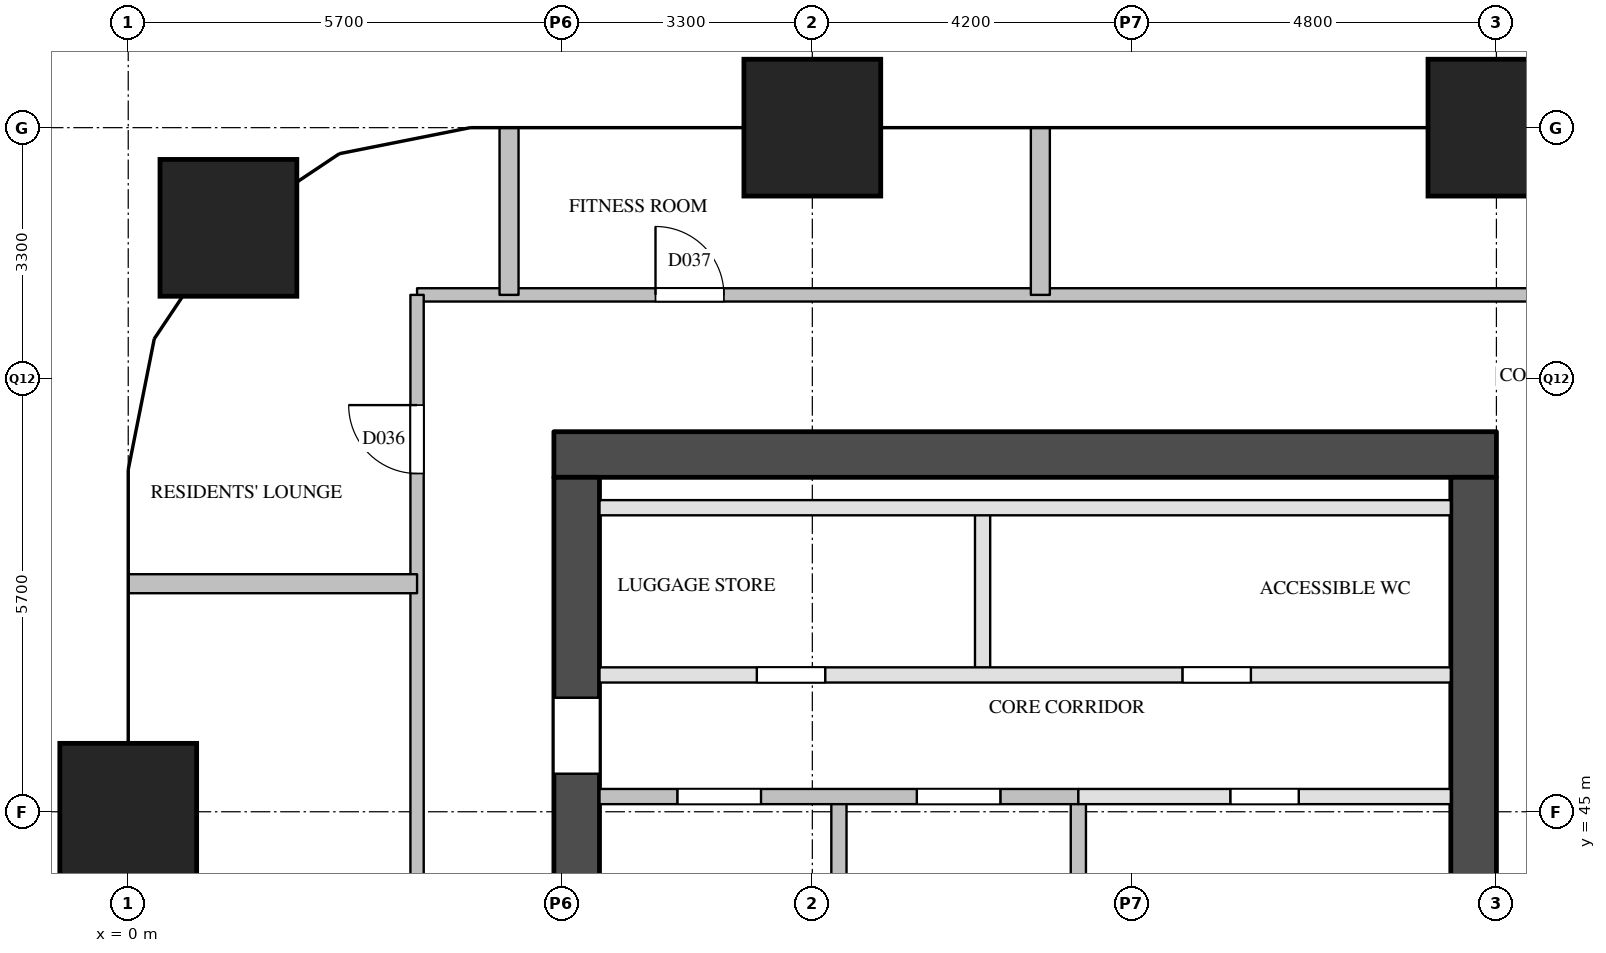
"""IFC4 building model, lengths in metres.
Left out: names, types, materials, properties, quantities, classifications, styles, units other than length and angle.
Written with IfcOpenShell. Run it as: python <this file> out.ifc"""

import sys

from ifc_helpers import new_model, si_unit, direction, frame, frame_2d, origin, origin_2d, place, context, subcontext, project, spatial, rectangle, extrude, element, fill, save


model = new_model("IFC4")
c1 = context("Model", 3, precision=1e-05, world=origin(), true_north=direction((0.0, 1.0)))
c2 = subcontext(c1, "Body", "Model", "MODEL_VIEW")
j1 = project(units=[si_unit("LENGTHUNIT", "METRE"), si_unit("PLANEANGLEUNIT", "RADIAN")], contexts=[c1])
p1 = place(None, origin())
s1 = spatial("IfcSite", under=j1, at=p1, CompositionType="ELEMENT")
p2 = place(p1, origin())
s2 = spatial("IfcBuilding", under=s1, at=p2, CompositionType="ELEMENT")
p3 = place(p2, frame((0.0, 0.0, 108.2)))
s3 = spatial("IfcBuildingStorey", under=s2, at=p3, CompositionType="ELEMENT", Elevation=108.2)
for number, where, z_axis, x_axis in (
    (1, (0.0, 45.0, 0.0), (0.0, 0.0, 1.0), (1.0, 0.0, 0.0)),
    (2, (1.318, 52.682, 0.0), (0.0, 0.0, 1.0), (1.0, 0.0, 0.0)),
    (3, (9.0, 54.0, 0.0), (0.0, 0.0, 1.0), (1.0, 0.0, 0.0)),
    (4, (18.0, 54.0, 0.0), (0.0, 0.0, 1.0), (1.0, 0.0, 0.0)),
):
    element("IfcColumn", number, at=place(p3, frame(where, z_axis=z_axis, x_axis=x_axis)), inside=s3, PredefinedType="COLUMN", context=c2, shape_type="SweptSolid", body=[
        extrude(rectangle(XDim=1.8, YDim=1.8, at=origin_2d()), origin(), (0.0, 0.0, 1.0), 3.8),
    ])
p4 = place(p3, frame((5.6, 49.7, 0.0), z_axis=(0.0, 0.0, 1.0), x_axis=(1.0, 0.0, 0.0)))
e5 = element("IfcWall", 5, at=p4, inside=s3, PredefinedType="SHEAR", context=c2, shape_type="SweptSolid", body=[
    extrude(rectangle(XDim=12.4, YDim=0.6, at=frame_2d((6.2, 0.0))), origin(), (0.0, 0.0, 1.0), 3.5),
])
p5 = place(p3, frame((5.9, 29.1, 0.0), z_axis=(0.0, 0.0, 1.0), x_axis=(0.0, 1.0, 0.0)))
e6 = element("IfcWall", 6, at=p5, inside=s3, PredefinedType="SHEAR", context=c2, shape_type="SweptSolid", body=[
    extrude(rectangle(XDim=20.3, YDim=0.6, at=frame_2d((10.15, 0.0))), origin(), (0.0, 0.0, 1.0), 3.5),
])
p6 = place(p5, frame((3.6, 0.0, 0.0)))
e7 = element("IfcOpeningElement", 7, at=p6, cuts=e6, PredefinedType="OPENING", context=c2, shape_type="SweptSolid", body=[
    extrude(rectangle(XDim=1.8, YDim=2.1, at=frame_2d((0.9, 1.05))), frame((0.0, 0.31, 0.0), z_axis=(0.0, -1.0, 0.0), x_axis=(1.0, 0.0, 0.0)), (0.0, 0.0, 1.0), 0.62),
])
p7 = place(p5, frame((16.4, 0.0, 0.0)))
e8 = element("IfcOpeningElement", 8, at=p7, cuts=e6, PredefinedType="OPENING", context=c2, shape_type="SweptSolid", body=[
    extrude(rectangle(XDim=1.0, YDim=2.1, at=frame_2d((0.5, 1.05))), frame((0.0, 0.31, 0.0), z_axis=(0.0, -1.0, 0.0), x_axis=(1.0, 0.0, 0.0)), (0.0, 0.0, 1.0), 0.62),
])
p8 = place(p3, frame((17.7, 29.1, 0.0), z_axis=(0.0, 0.0, 1.0), x_axis=(0.0, 1.0, 0.0)))
e9 = element("IfcWall", 9, at=p8, inside=s3, PredefinedType="SHEAR", context=c2, shape_type="SweptSolid", body=[
    extrude(rectangle(XDim=20.3, YDim=0.6, at=frame_2d((10.15, 0.0))), origin(), (0.0, 0.0, 1.0), 3.5),
])
p9 = place(p8, frame((1.25, 0.0, 0.0)))
e10 = element("IfcOpeningElement", 10, at=p9, cuts=e9, PredefinedType="OPENING", context=c2, shape_type="SweptSolid", body=[
    extrude(rectangle(XDim=0.7, YDim=2.1, at=frame_2d((0.35, 1.05))), frame((0.0, 0.31, 0.0), z_axis=(0.0, -1.0, 0.0), x_axis=(1.0, 0.0, 0.0)), (0.0, 0.0, 1.0), 0.62),
])
p10 = place(p8, frame((7.05, 0.0, 0.0)))
e11 = element("IfcOpeningElement", 11, at=p10, cuts=e9, PredefinedType="OPENING", context=c2, shape_type="SweptSolid", body=[
    extrude(rectangle(XDim=0.7, YDim=2.1, at=frame_2d((0.35, 1.05))), frame((0.0, 0.31, 0.0), z_axis=(0.0, -1.0, 0.0), x_axis=(1.0, 0.0, 0.0)), (0.0, 0.0, 1.0), 0.62),
])
p11 = place(p3, frame((9.35, 40.9, 0.0), z_axis=(0.0, 0.0, 1.0), x_axis=(0.0, 1.0, 0.0)))
e12 = element("IfcWall", 12, at=p11, inside=s3, PredefinedType="SOLIDWALL", context=c2, shape_type="SweptSolid", body=[
    extrude(rectangle(XDim=4.3, YDim=0.2, at=frame_2d((2.15, 0.0))), origin(), (0.0, 0.0, 1.0), 3.5),
])
p12 = place(p3, frame((11.24, 46.8, 0.0), z_axis=(0.0, 0.0, 1.0), x_axis=(0.0, 1.0, 0.0)))
e13 = element("IfcWall", 13, at=p12, inside=s3, PredefinedType="PARTITIONING", context=c2, shape_type="SweptSolid", body=[
    extrude(rectangle(XDim=2.2, YDim=0.2, at=frame_2d((1.1, 0.0))), origin(), (0.0, 0.0, 1.0), 3.5),
])
p13 = place(p3, frame((12.5, 40.9, 0.0), z_axis=(0.0, 0.0, 1.0), x_axis=(0.0, 1.0, 0.0)))
e14 = element("IfcWall", 14, at=p13, inside=s3, PredefinedType="SOLIDWALL", context=c2, shape_type="SweptSolid", body=[
    extrude(rectangle(XDim=4.3, YDim=0.2, at=frame_2d((2.15, 0.0))), origin(), (0.0, 0.0, 1.0), 3.5),
])
p14 = place(p3, frame((12.5, 45.2, 0.0), z_axis=(0.0, 0.0, 1.0), x_axis=(1.0, 0.0, 0.0)))
e15 = element("IfcWall", 15, at=p14, inside=s3, PredefinedType="PARTITIONING", context=c2, shape_type="SweptSolid", body=[
    extrude(rectangle(XDim=4.9, YDim=0.2, at=frame_2d((2.45, 0.0))), origin(), (0.0, 0.0, 1.0), 3.5),
])
p15 = place(p14, frame((2.0, 0.0, 0.0)))
e16 = element("IfcOpeningElement", 16, at=p15, cuts=e15, PredefinedType="OPENING", context=c2, shape_type="SweptSolid", body=[
    extrude(rectangle(XDim=0.9, YDim=2.1, at=frame_2d((0.45, 1.05))), frame((0.0, 0.11, 0.0), z_axis=(0.0, -1.0, 0.0), x_axis=(1.0, 0.0, 0.0)), (0.0, 0.0, 1.0), 0.22),
])
p16 = place(p3, frame((6.2, 45.2, 0.0), z_axis=(0.0, 0.0, 1.0), x_axis=(1.0, 0.0, 0.0)))
e17 = element("IfcWall", 17, at=p16, inside=s3, PredefinedType="SOLIDWALL", context=c2, shape_type="SweptSolid", body=[
    extrude(rectangle(XDim=6.3, YDim=0.2, at=frame_2d((3.15, 0.0))), origin(), (0.0, 0.0, 1.0), 3.5),
])
p17 = place(p16, frame((1.025, 0.0, 0.0)))
e18 = element("IfcOpeningElement", 18, at=p17, cuts=e17, PredefinedType="OPENING", context=c2, shape_type="SweptSolid", body=[
    extrude(rectangle(XDim=1.1, YDim=2.1, at=frame_2d((0.55, 1.05))), frame((0.0, 0.11, 0.0), z_axis=(0.0, -1.0, 0.0), x_axis=(1.0, 0.0, 0.0)), (0.0, 0.0, 1.0), 0.22),
])
p18 = place(p16, frame((4.175, 0.0, 0.0)))
e19 = element("IfcOpeningElement", 19, at=p18, cuts=e17, PredefinedType="OPENING", context=c2, shape_type="SweptSolid", body=[
    extrude(rectangle(XDim=1.1, YDim=2.1, at=frame_2d((0.55, 1.05))), frame((0.0, 0.11, 0.0), z_axis=(0.0, -1.0, 0.0), x_axis=(1.0, 0.0, 0.0)), (0.0, 0.0, 1.0), 0.22),
])
p19 = place(p3, frame((6.2, 46.8, 0.0), z_axis=(0.0, 0.0, 1.0), x_axis=(1.0, 0.0, 0.0)))
e20 = element("IfcWall", 20, at=p19, inside=s3, PredefinedType="PARTITIONING", context=c2, shape_type="SweptSolid", body=[
    extrude(rectangle(XDim=11.2, YDim=0.2, at=frame_2d((5.6, 0.0))), origin(), (0.0, 0.0, 1.0), 3.5),
])
p20 = place(p19, frame((2.07, 0.0, 0.0)))
e21 = element("IfcOpeningElement", 21, at=p20, cuts=e20, PredefinedType="OPENING", context=c2, shape_type="SweptSolid", body=[
    extrude(rectangle(XDim=0.9, YDim=2.1, at=frame_2d((0.45, 1.05))), frame((0.0, 0.11, 0.0), z_axis=(0.0, -1.0, 0.0), x_axis=(1.0, 0.0, 0.0)), (0.0, 0.0, 1.0), 0.22),
])
p21 = place(p19, frame((7.67, 0.0, 0.0)))
e22 = element("IfcOpeningElement", 22, at=p21, cuts=e20, PredefinedType="OPENING", context=c2, shape_type="SweptSolid", body=[
    extrude(rectangle(XDim=0.9, YDim=2.1, at=frame_2d((0.45, 1.05))), frame((0.0, 0.11, 0.0), z_axis=(0.0, -1.0, 0.0), x_axis=(1.0, 0.0, 0.0)), (0.0, 0.0, 1.0), 0.22),
])
p22 = place(p3, frame((6.2, 49.0, 0.0), z_axis=(0.0, 0.0, 1.0), x_axis=(1.0, 0.0, 0.0)))
e23 = element("IfcWall", 23, at=p22, inside=s3, PredefinedType="PARTITIONING", context=c2, shape_type="SweptSolid", body=[
    extrude(rectangle(XDim=11.2, YDim=0.2, at=frame_2d((5.6, 0.0))), origin(), (0.0, 0.0, 1.0), 3.5),
])
p23 = place(p3, frame((3.8, 51.8, 0.0), z_axis=(0.0, 0.0, 1.0), x_axis=(1.0, 0.0, 0.0)))
e24 = element("IfcWall", 24, at=p23, inside=s3, PredefinedType="PARTITIONING", context=c2, shape_type="SweptSolid", body=[
    extrude(rectangle(XDim=16.0, YDim=0.175, at=frame_2d((8.0, 0.0))), origin(), (0.0, 0.0, 1.0), 3.5),
])
p24 = place(p23, frame((3.137, 0.0, 0.0)))
e25 = element("IfcOpeningElement", 25, at=p24, cuts=e24, PredefinedType="OPENING", context=c2, shape_type="SweptSolid", body=[
    extrude(rectangle(XDim=0.9, YDim=2.1, at=frame_2d((0.45, 1.05))), frame((0.0, 0.097, 0.0), z_axis=(0.0, -1.0, 0.0), x_axis=(1.0, 0.0, 0.0)), (0.0, 0.0, 1.0), 0.195),
])
p25 = place(p3, frame((3.8, 28.5, 0.0), z_axis=(0.0, 0.0, 1.0), x_axis=(0.0, 1.0, 0.0)))
e26 = element("IfcWall", 26, at=p25, inside=s3, PredefinedType="PARTITIONING", context=c2, shape_type="SweptSolid", body=[
    extrude(rectangle(XDim=23.3, YDim=0.175, at=frame_2d((11.65, 0.0))), origin(), (0.0, 0.0, 1.0), 3.5),
])
p26 = place(p25, frame((3.3, 0.0, 0.0)))
e27 = element("IfcOpeningElement", 27, at=p26, cuts=e26, PredefinedType="OPENING", context=c2, shape_type="SweptSolid", body=[
    extrude(rectangle(XDim=0.9, YDim=2.1, at=frame_2d((0.45, 1.05))), frame((0.0, 0.097, 0.0), z_axis=(0.0, -1.0, 0.0), x_axis=(1.0, 0.0, 0.0)), (0.0, 0.0, 1.0), 0.195),
])
p27 = place(p25, frame((13.05, 0.0, 0.0)))
e28 = element("IfcOpeningElement", 28, at=p27, cuts=e26, PredefinedType="OPENING", context=c2, shape_type="SweptSolid", body=[
    extrude(rectangle(XDim=0.9, YDim=2.1, at=frame_2d((0.45, 1.05))), frame((0.0, 0.097, 0.0), z_axis=(0.0, -1.0, 0.0), x_axis=(1.0, 0.0, 0.0)), (0.0, 0.0, 1.0), 0.195),
])
p28 = place(p25, frame((20.95, 0.0, 0.0)))
e29 = element("IfcOpeningElement", 29, at=p28, cuts=e26, PredefinedType="OPENING", context=c2, shape_type="SweptSolid", body=[
    extrude(rectangle(XDim=0.9, YDim=2.1, at=frame_2d((0.45, 1.05))), frame((0.0, 0.097, 0.0), z_axis=(0.0, -1.0, 0.0), x_axis=(1.0, 0.0, 0.0)), (0.0, 0.0, 1.0), 0.195),
])
p29 = place(p3, frame((0.0, 48.0, 0.0), z_axis=(0.0, 0.0, 1.0), x_axis=(1.0, 0.0, 0.0)))
e30 = element("IfcWall", 30, at=p29, inside=s3, PredefinedType="PARTITIONING", context=c2, shape_type="SweptSolid", body=[
    extrude(rectangle(XDim=3.8, YDim=0.25, at=frame_2d((1.9, 0.0))), origin(), (0.0, 0.0, 1.0), 2.5),
])
for number, where, z_axis, x_axis in (
    (31, (5.01, 51.8, 0.0), (0.0, 0.0, 1.0), (0.0, 1.0, 0.0)),
    (32, (12.0, 51.8, 0.0), (0.0, 0.0, 1.0), (0.0, 1.0, 0.0)),
):
    element("IfcWall", number, at=place(p3, frame(where, z_axis=z_axis, x_axis=x_axis)), inside=s3, PredefinedType="PARTITIONING", context=c2, shape_type="SweptSolid", body=[
        extrude(rectangle(XDim=2.2, YDim=0.25, at=frame_2d((1.1, 0.0))), origin(), (0.0, 0.0, 1.0), 2.5),
    ])
p30 = place(p17, origin())
e33 = element("IfcDoor", 33, at=p30, inside=s3, OperationType="SINGLE_SWING_LEFT", PredefinedType="DOOR", context=c2, shape_type="SweptSolid", body=[
    extrude(rectangle(XDim=1.1, YDim=2.1, at=frame_2d((0.55, 1.05))), frame((0.0, 0.025, 0.0), z_axis=(0.0, -1.0, 0.0), x_axis=(1.0, 0.0, 0.0)), (0.0, 0.0, 1.0), 0.05),
])
fill(e18, e33)
p31 = place(p18, origin())
e34 = element("IfcDoor", 34, at=p31, inside=s3, OperationType="SINGLE_SWING_RIGHT", PredefinedType="DOOR", context=c2, shape_type="SweptSolid", body=[
    extrude(rectangle(XDim=1.1, YDim=2.1, at=frame_2d((0.55, 1.05))), frame((0.0, 0.025, 0.0), z_axis=(0.0, -1.0, 0.0), x_axis=(1.0, 0.0, 0.0)), (0.0, 0.0, 1.0), 0.05),
])
fill(e19, e34)
p32 = place(p7, origin())
e35 = element("IfcDoor", 35, at=p32, inside=s3, OperationType="SINGLE_SWING_RIGHT", PredefinedType="DOOR", context=c2, shape_type="SweptSolid", body=[
    extrude(rectangle(XDim=1.0, YDim=2.1, at=frame_2d((0.5, 1.05))), frame((0.0, 0.025, 0.0), z_axis=(0.0, -1.0, 0.0), x_axis=(1.0, 0.0, 0.0)), (0.0, 0.0, 1.0), 0.05),
])
fill(e8, e35)
p33 = place(p20, origin())
e36 = element("IfcDoor", 36, at=p33, inside=s3, OperationType="SINGLE_SWING_LEFT", PredefinedType="DOOR", context=c2, shape_type="SweptSolid", body=[
    extrude(rectangle(XDim=0.9, YDim=2.1, at=frame_2d((0.45, 1.05))), frame((0.0, 0.025, 0.0), z_axis=(0.0, -1.0, 0.0), x_axis=(1.0, 0.0, 0.0)), (0.0, 0.0, 1.0), 0.05),
])
fill(e21, e36)
p34 = place(p21, origin())
e37 = element("IfcDoor", 37, at=p34, inside=s3, OperationType="SINGLE_SWING_RIGHT", PredefinedType="DOOR", context=c2, shape_type="SweptSolid", body=[
    extrude(rectangle(XDim=0.9, YDim=2.1, at=frame_2d((0.45, 1.05))), frame((0.0, 0.025, 0.0), z_axis=(0.0, -1.0, 0.0), x_axis=(1.0, 0.0, 0.0)), (0.0, 0.0, 1.0), 0.05),
])
fill(e22, e37)
p35 = place(p15, origin())
e38 = element("IfcDoor", 38, at=p35, inside=s3, OperationType="SINGLE_SWING_RIGHT", PredefinedType="DOOR", context=c2, shape_type="SweptSolid", body=[
    extrude(rectangle(XDim=0.9, YDim=2.1, at=frame_2d((0.45, 1.05))), frame((0.0, 0.025, 0.0), z_axis=(0.0, -1.0, 0.0), x_axis=(1.0, 0.0, 0.0)), (0.0, 0.0, 1.0), 0.05),
])
fill(e16, e38)
p36 = place(p28, origin())
e39 = element("IfcDoor", 39, at=p36, inside=s3, OperationType="SINGLE_SWING_RIGHT", PredefinedType="DOOR", context=c2, shape_type="SweptSolid", body=[
    extrude(rectangle(XDim=0.9, YDim=2.1, at=frame_2d((0.45, 1.05))), frame((0.0, 0.025, 0.0), z_axis=(0.0, -1.0, 0.0), x_axis=(1.0, 0.0, 0.0)), (0.0, 0.0, 1.0), 0.05),
])
fill(e29, e39)
p37 = place(p24, origin())
e40 = element("IfcDoor", 40, at=p37, inside=s3, OperationType="SINGLE_SWING_LEFT", PredefinedType="DOOR", context=c2, shape_type="SweptSolid", body=[
    extrude(rectangle(XDim=0.9, YDim=2.1, at=frame_2d((0.45, 1.05))), frame((0.0, 0.025, 0.0), z_axis=(0.0, -1.0, 0.0), x_axis=(1.0, 0.0, 0.0)), (0.0, 0.0, 1.0), 0.05),
])
fill(e25, e40)
save(model, sys.argv[1])
